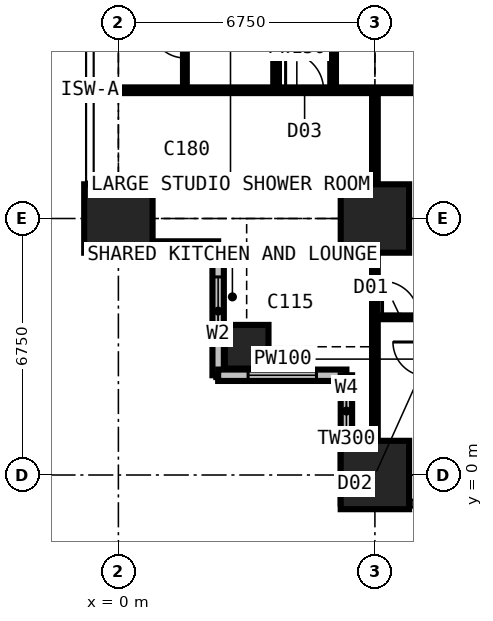
"""IFC4 building model, lengths in metres.
Left out: names, types, materials, properties, quantities, classifications, styles, units other than length and angle.
Written with IfcOpenShell. Run it as: python <this file> out.ifc"""

import sys

from ifc_helpers import new_model, si_unit, direction, frame, frame_2d, origin, origin_2d, place, context, subcontext, project, spatial, rectangle, extrude, element, fill, save


model = new_model("IFC4")
c1 = context("Model", 3, precision=1e-05, world=origin(), true_north=direction((0.0, 1.0)))
c2 = subcontext(c1, "Body", "Model", "MODEL_VIEW")
j1 = project(units=[si_unit("LENGTHUNIT", "METRE"), si_unit("PLANEANGLEUNIT", "RADIAN")], contexts=[c1])
p1 = place(None, origin())
s1 = spatial("IfcSite", under=j1, at=p1, CompositionType="ELEMENT")
p2 = place(p1, origin())
s2 = spatial("IfcBuilding", under=s1, at=p2, CompositionType="ELEMENT")
p3 = place(p2, frame((0.0, 0.0, 68.4)))
s3 = spatial("IfcBuildingStorey", under=s2, at=p3, CompositionType="ELEMENT", Elevation=68.4)
p4 = place(p3, frame((0.0, 6.75, 0.0), z_axis=(0.0, 0.0, 1.0), x_axis=(1.0, 0.0, 0.0)))
e1 = element("IfcColumn", 1, at=p4, inside=s3, PredefinedType="COLUMN", context=c2, shape_type="SweptSolid", body=[
    extrude(rectangle(XDim=1.8, YDim=1.8, at=origin_2d()), origin(), (0.0, 0.0, 1.0), 3.6),
])
p5 = place(p3, frame((3.375, 3.375, 0.0), z_axis=(0.0, 0.0, 1.0), x_axis=(1.0, 0.0, 0.0)))
e2 = element("IfcColumn", 2, at=p5, inside=s3, PredefinedType="COLUMN", context=c2, shape_type="SweptSolid", body=[
    extrude(rectangle(XDim=1.15, YDim=1.15, at=origin_2d()), origin(), (0.0, 0.0, 1.0), 3.6),
])
for number, where, z_axis, x_axis in (
    (3, (6.75, 0.0, 0.0), (0.0, 0.0, 1.0), (1.0, 0.0, 0.0)),
    (4, (6.75, 6.75, 0.0), (0.0, 0.0, 1.0), (1.0, 0.0, 0.0)),
):
    element("IfcColumn", number, at=place(p3, frame(where, z_axis=z_axis, x_axis=x_axis)), inside=s3, PredefinedType="COLUMN", context=c2, shape_type="SweptSolid", body=[
        extrude(rectangle(XDim=1.8, YDim=1.8, at=origin_2d()), origin(), (0.0, 0.0, 1.0), 3.6),
    ])
p6 = place(p3, frame((-0.75, 6.0, 0.0), z_axis=(0.0, 0.0, 1.0), x_axis=(1.0, 0.0, 0.0)))
e5 = element("IfcWall", 5, at=p6, inside=s3, PredefinedType="SOLIDWALL", context=c2, shape_type="SweptSolid", body=[
    extrude(rectangle(XDim=3.375, YDim=0.3, at=frame_2d((1.688, 0.0))), origin(), (0.0, 0.0, 1.0), 3.375),
])
p7 = place(p6, frame((1.833, 0.0, 0.9)))
e6 = element("IfcOpeningElement", 6, at=p7, cuts=e5, PredefinedType="OPENING", context=c2, shape_type="SweptSolid", body=[
    extrude(rectangle(XDim=1.2, YDim=1.8, at=frame_2d((0.6, 0.9))), frame((0.0, 0.16, 0.0), z_axis=(0.0, -1.0, 0.0), x_axis=(1.0, 0.0, 0.0)), (0.0, 0.0, 1.0), 0.32),
])
p8 = place(p3, frame((2.625, 6.0, 0.0), z_axis=(0.0, 0.0, 1.0), x_axis=(0.0, -1.0, 0.0)))
e7 = element("IfcWall", 7, at=p8, inside=s3, PredefinedType="SOLIDWALL", context=c2, shape_type="SweptSolid", body=[
    extrude(rectangle(XDim=3.375, YDim=0.3, at=frame_2d((1.688, 0.0))), origin(), (0.0, 0.0, 1.0), 3.375),
])
p9 = place(p8, frame((0.788, 0.0, 0.6)))
e8 = element("IfcOpeningElement", 8, at=p9, cuts=e7, PredefinedType="OPENING", context=c2, shape_type="SweptSolid", body=[
    extrude(rectangle(XDim=1.8, YDim=2.1, at=frame_2d((0.9, 1.05))), frame((0.0, 0.16, 0.0), z_axis=(0.0, -1.0, 0.0), x_axis=(1.0, 0.0, 0.0)), (0.0, 0.0, 1.0), 0.32),
])
p10 = place(p3, frame((2.625, 2.625, 0.0), z_axis=(0.0, 0.0, 1.0), x_axis=(1.0, 0.0, 0.0)))
e9 = element("IfcWall", 9, at=p10, inside=s3, PredefinedType="SOLIDWALL", context=c2, shape_type="SweptSolid", body=[
    extrude(rectangle(XDim=3.375, YDim=0.3, at=frame_2d((1.688, 0.0))), origin(), (0.0, 0.0, 1.0), 3.375),
])
p11 = place(p10, frame((0.788, 0.0, 0.6)))
e10 = element("IfcOpeningElement", 10, at=p11, cuts=e9, PredefinedType="OPENING", context=c2, shape_type="SweptSolid", body=[
    extrude(rectangle(XDim=1.8, YDim=2.1, at=frame_2d((0.9, 1.05))), frame((0.0, 0.16, 0.0), z_axis=(0.0, -1.0, 0.0), x_axis=(1.0, 0.0, 0.0)), (0.0, 0.0, 1.0), 0.32),
])
p12 = place(p3, frame((6.0, 2.625, 0.0), z_axis=(0.0, 0.0, 1.0), x_axis=(0.0, -1.0, 0.0)))
e11 = element("IfcWall", 11, at=p12, inside=s3, PredefinedType="SOLIDWALL", context=c2, shape_type="SweptSolid", body=[
    extrude(rectangle(XDim=3.375, YDim=0.3, at=frame_2d((1.688, 0.0))), origin(), (0.0, 0.0, 1.0), 3.375),
])
p13 = place(p12, frame((0.343, 0.0, 0.9)))
e12 = element("IfcOpeningElement", 12, at=p13, cuts=e11, PredefinedType="OPENING", context=c2, shape_type="SweptSolid", body=[
    extrude(rectangle(XDim=1.2, YDim=1.8, at=frame_2d((0.6, 0.9))), frame((0.0, 0.16, 0.0), z_axis=(0.0, -1.0, 0.0), x_axis=(1.0, 0.0, 0.0)), (0.0, 0.0, 1.0), 0.32),
])
p14 = place(p3, frame((-0.734, 10.125, 0.0), z_axis=(0.0, 0.0, 1.0), x_axis=(1.0, 0.0, 0.0)))
e13 = element("IfcWall", 13, at=p14, inside=s3, PredefinedType="PARTITIONING", context=c2, shape_type="SweptSolid", body=[
    extrude(rectangle(XDim=10.859, YDim=0.15, at=frame_2d((5.429, 0.0))), origin(), (0.0, 0.0, 1.0), 3.375),
])
p15 = place(p14, frame((5.134, 0.0, 0.0)))
e14 = element("IfcOpeningElement", 14, at=p15, cuts=e13, PredefinedType="OPENING", context=c2, shape_type="SweptSolid", body=[
    extrude(rectangle(XDim=1.0, YDim=2.2, at=frame_2d((0.5, 1.1))), frame((0.0, 0.085, 0.0), z_axis=(0.0, -1.0, 0.0), x_axis=(1.0, 0.0, 0.0)), (0.0, 0.0, 1.0), 0.17),
])
p16 = place(p3, frame((1.75, 10.125, 0.0), z_axis=(0.0, 0.0, 1.0), x_axis=(0.0, 1.0, 0.0)))
e15 = element("IfcWall", 15, at=p16, inside=s3, PredefinedType="PARTITIONING", context=c2, shape_type="SweptSolid", body=[
    extrude(rectangle(XDim=2.6, YDim=0.1, at=frame_2d((1.3, 0.0))), origin(), (0.0, 0.0, 1.0), 3.375),
])
p17 = place(p16, frame((0.85, 0.0, 0.0)))
e16 = element("IfcOpeningElement", 16, at=p17, cuts=e15, PredefinedType="OPENING", context=c2, shape_type="SweptSolid", body=[
    extrude(rectangle(XDim=0.9, YDim=2.2, at=frame_2d((0.45, 1.1))), frame((0.0, 0.06, 0.0), z_axis=(0.0, -1.0, 0.0), x_axis=(1.0, 0.0, 0.0)), (0.0, 0.0, 1.0), 0.12),
])
p18 = place(p3, frame((4.15, 10.125, 0.0), z_axis=(0.0, 0.0, 1.0), x_axis=(0.0, 1.0, 0.0)))
e17 = element("IfcWall", 17, at=p18, inside=s3, PredefinedType="PARTITIONING", context=c2, shape_type="SweptSolid", body=[
    extrude(rectangle(XDim=23.625, YDim=0.15, at=frame_2d((11.812, 0.0))), origin(), (0.0, 0.0, 1.0), 3.375),
])
p19 = place(p18, frame((20.5, 0.0, 0.0)))
e18 = element("IfcOpeningElement", 18, at=p19, cuts=e17, PredefinedType="OPENING", context=c2, shape_type="SweptSolid", body=[
    extrude(rectangle(XDim=0.95, YDim=2.2, at=frame_2d((0.475, 1.1))), frame((0.0, 0.085, 0.0), z_axis=(0.0, -1.0, 0.0), x_axis=(1.0, 0.0, 0.0)), (0.0, 0.0, 1.0), 0.17),
])
p20 = place(p18, frame((17.125, 0.0, 0.0)))
e19 = element("IfcOpeningElement", 19, at=p20, cuts=e17, PredefinedType="OPENING", context=c2, shape_type="SweptSolid", body=[
    extrude(rectangle(XDim=0.95, YDim=2.2, at=frame_2d((0.475, 1.1))), frame((0.0, 0.085, 0.0), z_axis=(0.0, -1.0, 0.0), x_axis=(1.0, 0.0, 0.0)), (0.0, 0.0, 1.0), 0.17),
])
p21 = place(p18, frame((13.7, 0.0, 0.0)))
e20 = element("IfcOpeningElement", 20, at=p21, cuts=e17, PredefinedType="OPENING", context=c2, shape_type="SweptSolid", body=[
    extrude(rectangle(XDim=0.95, YDim=2.2, at=frame_2d((0.475, 1.1))), frame((0.0, 0.085, 0.0), z_axis=(0.0, -1.0, 0.0), x_axis=(1.0, 0.0, 0.0)), (0.0, 0.0, 1.0), 0.17),
])
p22 = place(p18, frame((4.2, 0.0, 0.0)))
e21 = element("IfcOpeningElement", 21, at=p22, cuts=e17, PredefinedType="OPENING", context=c2, shape_type="SweptSolid", body=[
    extrude(rectangle(XDim=0.95, YDim=2.2, at=frame_2d((0.475, 1.1))), frame((0.0, 0.085, 0.0), z_axis=(0.0, -1.0, 0.0), x_axis=(1.0, 0.0, 0.0)), (0.0, 0.0, 1.0), 0.17),
])
p23 = place(p18, frame((10.95, 0.0, 0.0)))
e22 = element("IfcOpeningElement", 22, at=p23, cuts=e17, PredefinedType="OPENING", context=c2, shape_type="SweptSolid", body=[
    extrude(rectangle(XDim=0.95, YDim=2.2, at=frame_2d((0.475, 1.1))), frame((0.0, 0.085, 0.0), z_axis=(0.0, -1.0, 0.0), x_axis=(1.0, 0.0, 0.0)), (0.0, 0.0, 1.0), 0.17),
])
p24 = place(p3, frame((5.65, 10.125, 0.0), z_axis=(0.0, 0.0, 1.0), x_axis=(0.0, 1.0, 0.0)))
e23 = element("IfcWall", 23, at=p24, inside=s3, PredefinedType="PARTITIONING", context=c2, shape_type="SweptSolid", body=[
    extrude(rectangle(XDim=10.762, YDim=0.15, at=frame_2d((5.381, 0.0))), origin(), (0.0, 0.0, 1.0), 3.375),
])
p25 = place(p24, frame((4.9, 0.0, 0.0)))
e24 = element("IfcOpeningElement", 24, at=p25, cuts=e23, PredefinedType="OPENING", context=c2, shape_type="SweptSolid", body=[
    extrude(rectangle(XDim=0.95, YDim=2.2, at=frame_2d((0.475, 1.1))), frame((0.0, 0.085, 0.0), z_axis=(0.0, -1.0, 0.0), x_axis=(1.0, 0.0, 0.0)), (0.0, 0.0, 1.0), 0.17),
])
p26 = place(p3, frame((6.75, -0.734, 0.0), z_axis=(0.0, 0.0, 1.0), x_axis=(0.0, 1.0, 0.0)))
e25 = element("IfcWall", 25, at=p26, inside=s3, PredefinedType="PARTITIONING", context=c2, shape_type="SweptSolid", body=[
    extrude(rectangle(XDim=10.859, YDim=0.15, at=frame_2d((5.429, 0.0))), origin(), (0.0, 0.0, 1.0), 2.877),
])
p27 = place(p3, frame((6.75, 4.15, 0.0), z_axis=(0.0, 0.0, 1.0), x_axis=(1.0, 0.0, 0.0)))
e26 = element("IfcWall", 26, at=p27, inside=s3, PredefinedType="PARTITIONING", context=c2, shape_type="SweptSolid", body=[
    extrude(rectangle(XDim=23.625, YDim=0.1, at=frame_2d((11.812, 0.0))), origin(), (0.0, 0.0, 1.0), 3.375),
])
p28 = place(p27, frame((0.2, 0.0, 0.0)))
e27 = element("IfcOpeningElement", 27, at=p28, cuts=e26, PredefinedType="OPENING", context=c2, shape_type="SweptSolid", body=[
    extrude(rectangle(XDim=0.95, YDim=2.2, at=frame_2d((0.475, 1.1))), frame((0.0, 0.06, 0.0), z_axis=(0.0, -1.0, 0.0), x_axis=(1.0, 0.0, 0.0)), (0.0, 0.0, 1.0), 0.12),
])
p29 = place(p27, frame((3.625, 0.0, 0.0)))
e28 = element("IfcOpeningElement", 28, at=p29, cuts=e26, PredefinedType="OPENING", context=c2, shape_type="SweptSolid", body=[
    extrude(rectangle(XDim=0.95, YDim=2.2, at=frame_2d((0.475, 1.1))), frame((0.0, 0.06, 0.0), z_axis=(0.0, -1.0, 0.0), x_axis=(1.0, 0.0, 0.0)), (0.0, 0.0, 1.0), 0.12),
])
p30 = place(p27, frame((7.0, 0.0, 0.0)))
e29 = element("IfcOpeningElement", 29, at=p30, cuts=e26, PredefinedType="OPENING", context=c2, shape_type="SweptSolid", body=[
    extrude(rectangle(XDim=0.95, YDim=2.2, at=frame_2d((0.475, 1.1))), frame((0.0, 0.06, 0.0), z_axis=(0.0, -1.0, 0.0), x_axis=(1.0, 0.0, 0.0)), (0.0, 0.0, 1.0), 0.12),
])
p31 = place(p27, frame((10.375, 0.0, 0.0)))
e30 = element("IfcOpeningElement", 30, at=p31, cuts=e26, PredefinedType="OPENING", context=c2, shape_type="SweptSolid", body=[
    extrude(rectangle(XDim=0.95, YDim=2.2, at=frame_2d((0.475, 1.1))), frame((0.0, 0.06, 0.0), z_axis=(0.0, -1.0, 0.0), x_axis=(1.0, 0.0, 0.0)), (0.0, 0.0, 1.0), 0.12),
])
p32 = place(p27, frame((18.475, 0.0, 0.0)))
e31 = element("IfcOpeningElement", 31, at=p32, cuts=e26, PredefinedType="OPENING", context=c2, shape_type="SweptSolid", body=[
    extrude(rectangle(XDim=0.95, YDim=2.2, at=frame_2d((0.475, 1.1))), frame((0.0, 0.06, 0.0), z_axis=(0.0, -1.0, 0.0), x_axis=(1.0, 0.0, 0.0)), (0.0, 0.0, 1.0), 0.12),
])
p33 = place(p27, frame((13.7, 0.0, 0.0)))
e32 = element("IfcOpeningElement", 32, at=p33, cuts=e26, PredefinedType="OPENING", context=c2, shape_type="SweptSolid", body=[
    extrude(rectangle(XDim=0.95, YDim=2.2, at=frame_2d((0.475, 1.1))), frame((0.0, 0.06, 0.0), z_axis=(0.0, -1.0, 0.0), x_axis=(1.0, 0.0, 0.0)), (0.0, 0.0, 1.0), 0.12),
])
p34 = place(p7, origin())
e33 = element("IfcWindow", 33, at=p34, inside=s3, PartitioningType="SINGLE_PANEL", PredefinedType="WINDOW", context=c2, shape_type="SweptSolid", body=[
    extrude(rectangle(XDim=1.2, YDim=1.8, at=frame_2d((0.6, 0.9))), frame((0.0, 0.03, 0.0), z_axis=(0.0, -1.0, 0.0), x_axis=(1.0, 0.0, 0.0)), (0.0, 0.0, 1.0), 0.06),
])
fill(e6, e33)
p35 = place(p9, origin())
e34 = element("IfcWindow", 34, at=p35, inside=s3, PartitioningType="SINGLE_PANEL", PredefinedType="WINDOW", context=c2, shape_type="SweptSolid", body=[
    extrude(rectangle(XDim=1.8, YDim=2.1, at=frame_2d((0.9, 1.05))), frame((0.0, 0.03, 0.0), z_axis=(0.0, -1.0, 0.0), x_axis=(1.0, 0.0, 0.0)), (0.0, 0.0, 1.0), 0.06),
])
fill(e8, e34)
p36 = place(p11, origin())
e35 = element("IfcWindow", 35, at=p36, inside=s3, PartitioningType="SINGLE_PANEL", PredefinedType="WINDOW", context=c2, shape_type="SweptSolid", body=[
    extrude(rectangle(XDim=1.8, YDim=2.1, at=frame_2d((0.9, 1.05))), frame((0.0, 0.03, 0.0), z_axis=(0.0, -1.0, 0.0), x_axis=(1.0, 0.0, 0.0)), (0.0, 0.0, 1.0), 0.06),
])
fill(e10, e35)
p37 = place(p13, origin())
e36 = element("IfcWindow", 36, at=p37, inside=s3, PartitioningType="SINGLE_PANEL", PredefinedType="WINDOW", context=c2, shape_type="SweptSolid", body=[
    extrude(rectangle(XDim=1.2, YDim=1.8, at=frame_2d((0.6, 0.9))), frame((0.0, 0.03, 0.0), z_axis=(0.0, -1.0, 0.0), x_axis=(1.0, 0.0, 0.0)), (0.0, 0.0, 1.0), 0.06),
])
fill(e12, e36)
p38 = place(p15, origin())
e37 = element("IfcDoor", 37, at=p38, inside=s3, OperationType="SINGLE_SWING_LEFT", PredefinedType="DOOR", context=c2, shape_type="SweptSolid", body=[
    extrude(rectangle(XDim=1.0, YDim=2.2, at=frame_2d((0.5, 1.1))), frame((0.0, 0.025, 0.0), z_axis=(0.0, -1.0, 0.0), x_axis=(1.0, 0.0, 0.0)), (0.0, 0.0, 1.0), 0.05),
])
fill(e14, e37)
p39 = place(p28, origin())
e38 = element("IfcDoor", 38, at=p39, inside=s3, OperationType="SINGLE_SWING_LEFT", PredefinedType="DOOR", context=c2, shape_type="SweptSolid", body=[
    extrude(rectangle(XDim=0.95, YDim=2.2, at=frame_2d((0.475, 1.1))), frame((0.0, 0.025, 0.0), z_axis=(0.0, -1.0, 0.0), x_axis=(1.0, 0.0, 0.0)), (0.0, 0.0, 1.0), 0.05),
])
fill(e27, e38)
p40 = place(p17, origin())
e39 = element("IfcDoor", 39, at=p40, inside=s3, OperationType="SINGLE_SWING_RIGHT", PredefinedType="DOOR", context=c2, shape_type="SweptSolid", body=[
    extrude(rectangle(XDim=0.9, YDim=2.2, at=frame_2d((0.45, 1.1))), frame((0.0, 0.025, 0.0), z_axis=(0.0, -1.0, 0.0), x_axis=(1.0, 0.0, 0.0)), (0.0, 0.0, 1.0), 0.05),
])
fill(e16, e39)
save(model, sys.argv[1])
